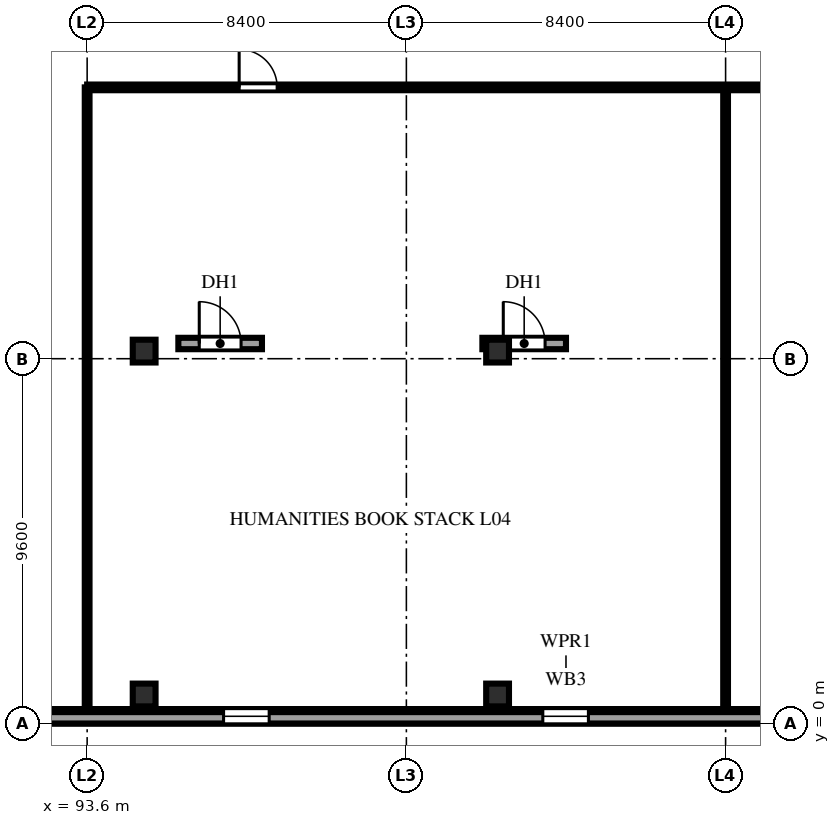
"""IFC4 building model, lengths in metres.
Left out: names, types, materials, properties, quantities, classifications, styles, units other than length and angle.
Written with IfcOpenShell. Run it as: python <this file> out.ifc"""

import sys

from ifc_helpers import new_model, si_unit, direction, frame, frame_2d, origin, origin_2d, place, context, subcontext, project, spatial, rectangle, extrude, element, fill, save


model = new_model("IFC4")
c1 = context("Model", 3, precision=1e-05, world=origin(), true_north=direction((0.0, 1.0)))
c2 = subcontext(c1, "Body", "Model", "MODEL_VIEW")
j1 = project(units=[si_unit("LENGTHUNIT", "METRE"), si_unit("PLANEANGLEUNIT", "RADIAN")], contexts=[c1])
p1 = place(None, origin())
s1 = spatial("IfcSite", under=j1, at=p1, CompositionType="ELEMENT")
p2 = place(p1, origin())
s2 = spatial("IfcBuilding", under=s1, at=p2, CompositionType="ELEMENT")
p3 = place(p2, frame((0.0, 0.0, 19.6)))
s3 = spatial("IfcBuildingStorey", under=s2, at=p3, CompositionType="ELEMENT", Elevation=19.6)
for number, where, z_axis, x_axis in (
    (1, (95.1, 0.75, 0.0), (0.0, 0.0, 1.0), (1.0, 0.0, 0.0)),
    (2, (95.1, 9.8, 0.0), (0.0, 0.0, 1.0), (1.0, 0.0, 0.0)),
    (3, (104.4, 0.75, 0.0), (0.0, 0.0, 1.0), (1.0, 0.0, 0.0)),
    (4, (104.4, 9.8, 0.0), (0.0, 0.0, 1.0), (1.0, 0.0, 0.0)),
):
    element("IfcColumn", number, at=place(p3, frame(where, z_axis=z_axis, x_axis=x_axis)), inside=s3, PredefinedType="COLUMN", context=c2, shape_type="SweptSolid", body=[
        extrude(rectangle(XDim=0.6, YDim=0.6, at=origin_2d()), origin(), (0.0, 0.0, 1.0), 4.32),
    ])
p4 = place(p3, frame((85.39, 0.19, 0.0), z_axis=(0.0, 0.0, 1.0), x_axis=(1.0, 0.0, 0.0)))
e5 = element("IfcWall", 5, at=p4, inside=s3, PredefinedType="SOLIDWALL", context=c2, shape_type="SweptSolid", body=[
    extrude(rectangle(XDim=41.62, YDim=0.38, at=frame_2d((20.81, 0.0))), origin(), (0.0, 0.0, 1.0), 4.32),
])
p5 = place(p4, frame((5.0, 0.0, 1.25)))
e6 = element("IfcOpeningElement", 6, at=p5, cuts=e5, PredefinedType="OPENING", context=c2, shape_type="SweptSolid", body=[
    extrude(rectangle(XDim=1.2, YDim=1.65, at=frame_2d((0.6, 0.825))), frame((0.0, 0.202, 0.0), z_axis=(0.0, -1.0, 0.0), x_axis=(1.0, 0.0, 0.0)), (0.0, 0.0, 1.0), 0.404),
])
p6 = place(p4, frame((11.8, 0.0, 1.25)))
e7 = element("IfcOpeningElement", 7, at=p6, cuts=e5, PredefinedType="OPENING", context=c2, shape_type="SweptSolid", body=[
    extrude(rectangle(XDim=1.2, YDim=1.65, at=frame_2d((0.6, 0.825))), frame((0.0, 0.202, 0.0), z_axis=(0.0, -1.0, 0.0), x_axis=(1.0, 0.0, 0.0)), (0.0, 0.0, 1.0), 0.404),
])
p7 = place(p4, frame((20.2, 0.0, 1.25)))
e8 = element("IfcOpeningElement", 8, at=p7, cuts=e5, PredefinedType="OPENING", context=c2, shape_type="SweptSolid", body=[
    extrude(rectangle(XDim=1.2, YDim=1.65, at=frame_2d((0.6, 0.825))), frame((0.0, 0.202, 0.0), z_axis=(0.0, -1.0, 0.0), x_axis=(1.0, 0.0, 0.0)), (0.0, 0.0, 1.0), 0.404),
])
p8 = place(p4, frame((26.8, 0.0, 1.25)))
e9 = element("IfcOpeningElement", 9, at=p8, cuts=e5, PredefinedType="OPENING", context=c2, shape_type="SweptSolid", body=[
    extrude(rectangle(XDim=1.2, YDim=1.65, at=frame_2d((0.6, 0.825))), frame((0.0, 0.202, 0.0), z_axis=(0.0, -1.0, 0.0), x_axis=(1.0, 0.0, 0.0)), (0.0, 0.0, 1.0), 0.404),
])
p9 = place(p4, frame((36.8, 0.0, 1.25)))
e10 = element("IfcOpeningElement", 10, at=p9, cuts=e5, PredefinedType="OPENING", context=c2, shape_type="SweptSolid", body=[
    extrude(rectangle(XDim=1.2, YDim=1.65, at=frame_2d((0.6, 0.825))), frame((0.0, 0.202, 0.0), z_axis=(0.0, -1.0, 0.0), x_axis=(1.0, 0.0, 0.0)), (0.0, 0.0, 1.0), 0.404),
])
p10 = place(p3, frame((85.35, 0.15, 4.6), z_axis=(0.0, 0.0, 1.0), x_axis=(1.0, 0.0, 0.0)))
e11 = element("IfcWall", 11, at=p10, inside=s3, PredefinedType="PARAPET", context=c2, shape_type="SweptSolid", body=[
    extrude(rectangle(XDim=41.7, YDim=0.3, at=frame_2d((20.85, 0.0))), origin(), (0.0, 0.0, 1.0), 1.15),
])
p11 = place(p3, frame((96.0, 10.0, 4.9), z_axis=(0.0, 0.0, 1.0), x_axis=(1.0, 0.0, 0.0)))
e12 = element("IfcWall", 12, at=p11, inside=s3, PredefinedType="PARAPET", context=c2, shape_type="SweptSolid", body=[
    extrude(rectangle(XDim=2.2, YDim=0.3, at=frame_2d((1.1, 0.0))), origin(), (0.0, 0.0, 1.0), 1.8),
])
p12 = place(p11, frame((0.55, 0.0, 0.2)))
e13 = element("IfcOpeningElement", 13, at=p12, cuts=e12, PredefinedType="OPENING", context=c2, shape_type="SweptSolid", body=[
    extrude(rectangle(XDim=1.1, YDim=1.4, at=frame_2d((0.55, 0.7))), frame((0.0, 0.162, 0.0), z_axis=(0.0, -1.0, 0.0), x_axis=(1.0, 0.0, 0.0)), (0.0, 0.0, 1.0), 0.324),
])
p13 = place(p3, frame((104.0, 10.0, 4.9), z_axis=(0.0, 0.0, 1.0), x_axis=(1.0, 0.0, 0.0)))
e14 = element("IfcWall", 14, at=p13, inside=s3, PredefinedType="PARAPET", context=c2, shape_type="SweptSolid", body=[
    extrude(rectangle(XDim=2.2, YDim=0.3, at=frame_2d((1.1, 0.0))), origin(), (0.0, 0.0, 1.0), 1.8),
])
p14 = place(p13, frame((0.55, 0.0, 0.2)))
e15 = element("IfcOpeningElement", 15, at=p14, cuts=e14, PredefinedType="OPENING", context=c2, shape_type="SweptSolid", body=[
    extrude(rectangle(XDim=1.1, YDim=1.4, at=frame_2d((0.55, 0.7))), frame((0.0, 0.162, 0.0), z_axis=(0.0, -1.0, 0.0), x_axis=(1.0, 0.0, 0.0)), (0.0, 0.0, 1.0), 0.324),
])
for number, where, z_axis, x_axis in (
    (16, (93.6, 0.35, 0.0), (0.0, 0.0, 1.0), (0.0, 1.0, 0.0)),
    (17, (110.4, 0.35, 0.0), (0.0, 0.0, 1.0), (0.0, 1.0, 0.0)),
):
    element("IfcWall", number, at=place(p3, frame(where, z_axis=z_axis, x_axis=x_axis)), inside=s3, PredefinedType="PARTITIONING", context=c2, shape_type="SweptSolid", body=[
        extrude(rectangle(XDim=16.39, YDim=0.125, at=frame_2d((8.195, 0.0))), origin(), (0.0, 0.0, 1.0), 4.32),
    ])
p15 = place(p3, frame((93.6, 16.74, 0.0), z_axis=(0.0, 0.0, 1.0), x_axis=(1.0, 0.0, 0.0)))
e18 = element("IfcWall", 18, at=p15, inside=s3, PredefinedType="PARTITIONING", context=c2, shape_type="SweptSolid", body=[
    extrude(rectangle(XDim=25.2, YDim=0.15, at=frame_2d((12.6, 0.0))), origin(), (0.0, 0.0, 1.0), 4.32),
])
p16 = place(p15, frame((4.0, 0.0, 0.0)))
e19 = element("IfcOpeningElement", 19, at=p16, cuts=e18, PredefinedType="OPENING", context=c2, shape_type="SweptSolid", body=[
    extrude(rectangle(XDim=1.0, YDim=2.2, at=frame_2d((0.5, 1.1))), frame((0.0, 0.087, 0.0), z_axis=(0.0, -1.0, 0.0), x_axis=(1.0, 0.0, 0.0)), (0.0, 0.0, 1.0), 0.174),
])
p17 = place(p15, frame((19.0, 0.0, 0.0)))
e20 = element("IfcOpeningElement", 20, at=p17, cuts=e18, PredefinedType="OPENING", context=c2, shape_type="SweptSolid", body=[
    extrude(rectangle(XDim=0.95, YDim=2.15, at=frame_2d((0.475, 1.075))), frame((0.0, 0.087, 0.0), z_axis=(0.0, -1.0, 0.0), x_axis=(1.0, 0.0, 0.0)), (0.0, 0.0, 1.0), 0.174),
])
p18 = place(p6, origin())
e21 = element("IfcWindow", 21, at=p18, inside=s3, PartitioningType="SINGLE_PANEL", PredefinedType="WINDOW", context=c2, shape_type="SweptSolid", body=[
    extrude(rectangle(XDim=1.2, YDim=1.65, at=frame_2d((0.6, 0.825))), frame((0.0, 0.11, 0.0), z_axis=(0.0, -1.0, 0.0), x_axis=(1.0, 0.0, 0.0)), (0.0, 0.0, 1.0), 0.06),
])
fill(e7, e21)
p19 = place(p7, origin())
e22 = element("IfcWindow", 22, at=p19, inside=s3, PartitioningType="SINGLE_PANEL", PredefinedType="WINDOW", context=c2, shape_type="SweptSolid", body=[
    extrude(rectangle(XDim=1.2, YDim=1.65, at=frame_2d((0.6, 0.825))), frame((0.0, 0.11, 0.0), z_axis=(0.0, -1.0, 0.0), x_axis=(1.0, 0.0, 0.0)), (0.0, 0.0, 1.0), 0.06),
])
fill(e8, e22)
p20 = place(p12, origin())
e23 = element("IfcDoor", 23, at=p20, inside=s3, OperationType="SINGLE_SWING_LEFT", PredefinedType="TRAPDOOR", context=c2, shape_type="SweptSolid", body=[
    extrude(rectangle(XDim=1.1, YDim=1.4, at=frame_2d((0.55, 0.7))), frame((0.0, 0.025, 0.0), z_axis=(0.0, -1.0, 0.0), x_axis=(1.0, 0.0, 0.0)), (0.0, 0.0, 1.0), 0.05),
])
fill(e13, e23)
p21 = place(p14, origin())
e24 = element("IfcDoor", 24, at=p21, inside=s3, OperationType="SINGLE_SWING_LEFT", PredefinedType="TRAPDOOR", context=c2, shape_type="SweptSolid", body=[
    extrude(rectangle(XDim=1.1, YDim=1.4, at=frame_2d((0.55, 0.7))), frame((0.0, 0.025, 0.0), z_axis=(0.0, -1.0, 0.0), x_axis=(1.0, 0.0, 0.0)), (0.0, 0.0, 1.0), 0.05),
])
fill(e15, e24)
p22 = place(p16, origin())
e25 = element("IfcDoor", 25, at=p22, inside=s3, OperationType="SINGLE_SWING_LEFT", PredefinedType="DOOR", context=c2, shape_type="SweptSolid", body=[
    extrude(rectangle(XDim=1.0, YDim=2.2, at=frame_2d((0.5, 1.1))), frame((0.0, 0.025, 0.0), z_axis=(0.0, -1.0, 0.0), x_axis=(1.0, 0.0, 0.0)), (0.0, 0.0, 1.0), 0.05),
])
fill(e19, e25)
save(model, sys.argv[1])
